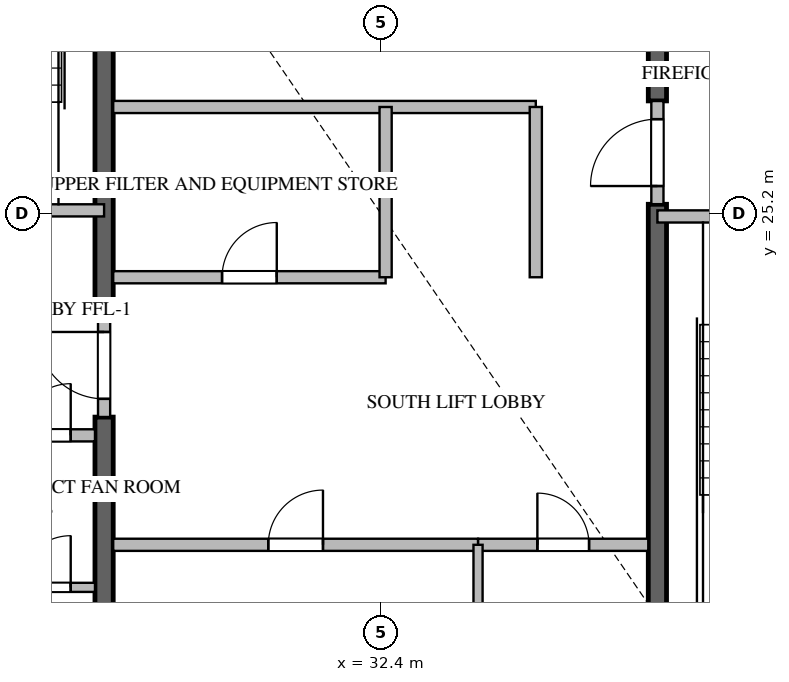
"""IFC4 building model, lengths in metres.
Left out: names, types, materials, properties, quantities, classifications, styles, units other than length and angle.
Written with IfcOpenShell. Run it as: python <this file> out.ifc"""

import sys

from ifc_helpers import new_model, si_unit, direction, frame, frame_2d, origin, place, context, subcontext, project, spatial, rectangle, extrude, source, transform, mapped, element, fill, save


model = new_model("IFC4")
c1 = context("Model", 3, precision=1e-05, world=origin(), true_north=direction((0.0, 1.0)))
c2 = subcontext(c1, "Body", "Model", "MODEL_VIEW")
j1 = project(units=[si_unit("LENGTHUNIT", "METRE"), si_unit("PLANEANGLEUNIT", "RADIAN")], contexts=[c1])
p1 = place(None, origin())
s1 = spatial("IfcSite", under=j1, at=p1, CompositionType="ELEMENT")
p2 = place(p1, origin())
s2 = spatial("IfcBuilding", under=s1, at=p2, CompositionType="ELEMENT")
p3 = place(p2, frame((0.0, 0.0, 313.7)))
s3 = spatial("IfcBuildingStorey", under=s2, at=p3, CompositionType="ELEMENT", Elevation=313.7)
p4 = place(p3, frame((27.85, 16.975, -0.26), z_axis=(0.0, 0.0, 1.0), x_axis=(0.0, 1.0, 0.0)))
e1 = element("IfcWall", 1, at=p4, inside=s3, PredefinedType="SHEAR", context=c2, shape_type="SweptSolid", body=[
    extrude(rectangle(XDim=4.875, YDim=0.3, at=frame_2d((2.438, 0.0))), origin(), (0.0, 0.0, 1.0), 4.048),
])
p5 = place(p3, frame((27.85, 23.55, -0.26), z_axis=(0.0, 0.0, 1.0), x_axis=(0.0, 1.0, 0.0)))
e2 = element("IfcWall", 2, at=p5, inside=s3, PredefinedType="SHEAR", context=c2, shape_type="SweptSolid", body=[
    extrude(rectangle(XDim=9.875, YDim=0.3, at=frame_2d((4.938, 0.0))), origin(), (0.0, 0.0, 1.0), 4.048),
])
p6 = place(p3, frame((36.95, 16.975, -0.26), z_axis=(0.0, 0.0, 1.0), x_axis=(0.0, 1.0, 0.0)))
e3 = element("IfcWall", 3, at=p6, inside=s3, PredefinedType="SHEAR", context=c2, shape_type="SweptSolid", body=[
    extrude(rectangle(XDim=8.375, YDim=0.3, at=frame_2d((4.188, 0.0))), origin(), (0.0, 0.0, 1.0), 4.048),
])
p7 = place(p3, frame((36.95, 27.05, -0.26), z_axis=(0.0, 0.0, 1.0), x_axis=(0.0, 1.0, 0.0)))
e4 = element("IfcWall", 4, at=p7, inside=s3, PredefinedType="SHEAR", context=c2, shape_type="SweptSolid", body=[
    extrude(rectangle(XDim=6.375, YDim=0.3, at=frame_2d((3.188, 0.0))), origin(), (0.0, 0.0, 1.0), 4.048),
])
p8 = place(p3, frame((23.4, 25.25, 0.0), z_axis=(0.0, 0.0, 1.0), x_axis=(1.0, 0.0, 0.0)))
e5 = element("IfcWall", 5, at=p8, inside=s3, PredefinedType="STANDARD", context=c2, shape_type="SweptSolid", body=[
    extrude(rectangle(XDim=4.45, YDim=0.2, at=frame_2d((2.225, 0.0))), origin(), (0.0, 0.0, 1.0), 3.79),
])
p9 = place(p8, frame((1.65, 0.0, 0.0)))
e6 = element("IfcOpeningElement", 6, at=p9, cuts=e5, PredefinedType="OPENING", context=c2, shape_type="SweptSolid", body=[
    extrude(rectangle(XDim=1.1, YDim=2.15, at=frame_2d((0.55, 1.075))), frame((0.0, 0.11, 0.0), z_axis=(0.0, -1.0, 0.0), x_axis=(1.0, 0.0, 0.0)), (0.0, 0.0, 1.0), 0.22),
])
p10 = place(p3, frame((36.95, 25.15, 0.0), z_axis=(0.0, 0.0, 1.0), x_axis=(1.0, 0.0, 0.0)))
e7 = element("IfcWall", 7, at=p10, inside=s3, PredefinedType="STANDARD", context=c2, shape_type="SweptSolid", body=[
    extrude(rectangle(XDim=4.45, YDim=0.2, at=frame_2d((2.225, 0.0))), origin(), (0.0, 0.0, 1.0), 3.79),
])
p11 = place(p10, frame((1.65, 0.0, 0.0)))
e8 = element("IfcOpeningElement", 8, at=p11, cuts=e7, PredefinedType="OPENING", context=c2, shape_type="SweptSolid", body=[
    extrude(rectangle(XDim=1.1, YDim=2.15, at=frame_2d((0.55, 1.075))), frame((0.0, 0.11, 0.0), z_axis=(0.0, -1.0, 0.0), x_axis=(1.0, 0.0, 0.0)), (0.0, 0.0, 1.0), 0.22),
])
p12 = place(p3, frame((26.052, 21.55, 0.0), z_axis=(0.0, 0.0, 1.0), x_axis=(1.0, 0.0, 0.0)))
e9 = element("IfcWall", 9, at=p12, inside=s3, PredefinedType="STANDARD", context=c2, shape_type="SweptSolid", body=[
    extrude(rectangle(XDim=1.648, YDim=0.2, at=frame_2d((0.824, 0.0))), origin(), (0.0, 0.0, 1.0), 3.79),
])
p13 = place(p12, frame((0.399, 0.0, 0.0)))
e10 = element("IfcOpeningElement", 10, at=p13, cuts=e9, PredefinedType="OPENING", context=c2, shape_type="SweptSolid", body=[
    extrude(rectangle(XDim=0.85, YDim=2.1, at=frame_2d((0.425, 1.05))), frame((0.0, 0.11, 0.0), z_axis=(0.0, -1.0, 0.0), x_axis=(1.0, 0.0, 0.0)), (0.0, 0.0, 1.0), 0.22),
])
p14 = place(p3, frame((27.85, 21.852, 0.0), z_axis=(0.0, 0.0, 1.0), x_axis=(0.0, 1.0, 0.0)))
e11 = element("IfcWall", 11, at=p14, inside=s3, PredefinedType="STANDARD", context=c2, shape_type="SweptSolid", body=[
    extrude(rectangle(XDim=1.696, YDim=0.2, at=frame_2d((0.848, 0.0))), origin(), (0.0, 0.0, 1.0), 3.79),
])
p15 = place(p14, frame((0.298, 0.0, 0.0)))
e12 = element("IfcOpeningElement", 12, at=p15, cuts=e11, PredefinedType="OPENING", context=c2, shape_type="SweptSolid", body=[
    extrude(rectangle(XDim=1.1, YDim=2.15, at=frame_2d((0.55, 1.075))), frame((0.0, 0.11, 0.0), z_axis=(0.0, -1.0, 0.0), x_axis=(1.0, 0.0, 0.0)), (0.0, 0.0, 1.0), 0.22),
])
p16 = place(p3, frame((36.95, 25.352, 0.0), z_axis=(0.0, 0.0, 1.0), x_axis=(0.0, 1.0, 0.0)))
e13 = element("IfcWall", 13, at=p16, inside=s3, PredefinedType="STANDARD", context=c2, shape_type="SweptSolid", body=[
    extrude(rectangle(XDim=1.696, YDim=0.2, at=frame_2d((0.848, 0.0))), origin(), (0.0, 0.0, 1.0), 3.79),
])
p17 = place(p16, frame((0.298, 0.0, 0.0)))
e14 = element("IfcOpeningElement", 14, at=p17, cuts=e13, PredefinedType="OPENING", context=c2, shape_type="SweptSolid", body=[
    extrude(rectangle(XDim=1.1, YDim=2.15, at=frame_2d((0.55, 1.075))), frame((0.0, 0.11, 0.0), z_axis=(0.0, -1.0, 0.0), x_axis=(1.0, 0.0, 0.0)), (0.0, 0.0, 1.0), 0.22),
])
p18 = place(p3, frame((26.052, 19.05, 0.0), z_axis=(0.0, 0.0, 1.0), x_axis=(1.0, 0.0, 0.0)))
e15 = element("IfcWall", 15, at=p18, inside=s3, PredefinedType="PARTITIONING", context=c2, shape_type="SweptSolid", body=[
    extrude(rectangle(XDim=1.648, YDim=0.15, at=frame_2d((0.824, 0.0))), origin(), (0.0, 0.0, 1.0), 3.79),
])
p19 = place(p18, frame((0.399, 0.0, 0.0)))
e16 = element("IfcOpeningElement", 16, at=p19, cuts=e15, PredefinedType="OPENING", context=c2, shape_type="SweptSolid", body=[
    extrude(rectangle(XDim=0.85, YDim=2.1, at=frame_2d((0.425, 1.05))), frame((0.0, 0.085, 0.0), z_axis=(0.0, -1.0, 0.0), x_axis=(1.0, 0.0, 0.0)), (0.0, 0.0, 1.0), 0.17),
])
p20 = place(p3, frame((28.0, 19.75, 0.0), z_axis=(0.0, 0.0, 1.0), x_axis=(1.0, 0.0, 0.0)))
e17 = element("IfcWall", 17, at=p20, inside=s3, PredefinedType="STANDARD", context=c2, shape_type="SweptSolid", body=[
    extrude(rectangle(XDim=6.0, YDim=0.2, at=frame_2d((3.0, 0.0))), origin(), (0.0, 0.0, 1.0), 3.79),
])
p21 = place(p20, frame((2.55, 0.0, 0.0)))
e18 = element("IfcOpeningElement", 18, at=p21, cuts=e17, PredefinedType="OPENING", context=c2, shape_type="SweptSolid", body=[
    extrude(rectangle(XDim=0.9, YDim=2.1, at=frame_2d((0.45, 1.05))), frame((0.0, 0.11, 0.0), z_axis=(0.0, -1.0, 0.0), x_axis=(1.0, 0.0, 0.0)), (0.0, 0.0, 1.0), 0.22),
])
p22 = place(p3, frame((34.002, 19.75, 0.0), z_axis=(0.0, 0.0, 1.0), x_axis=(1.0, 0.0, 0.0)))
e19 = element("IfcWall", 19, at=p22, inside=s3, PredefinedType="STANDARD", context=c2, shape_type="SweptSolid", body=[
    extrude(rectangle(XDim=2.798, YDim=0.2, at=frame_2d((1.399, 0.0))), origin(), (0.0, 0.0, 1.0), 3.79),
])
p23 = place(p22, frame((0.974, 0.0, 0.0)))
e20 = element("IfcOpeningElement", 20, at=p23, cuts=e19, PredefinedType="OPENING", context=c2, shape_type="SweptSolid", body=[
    extrude(rectangle(XDim=0.85, YDim=2.1, at=frame_2d((0.425, 1.05))), frame((0.0, 0.11, 0.0), z_axis=(0.0, -1.0, 0.0), x_axis=(1.0, 0.0, 0.0)), (0.0, 0.0, 1.0), 0.22),
])
p24 = place(p3, frame((34.0, 17.02, 0.0), z_axis=(0.0, 0.0, 1.0), x_axis=(0.0, 1.0, 0.0)))
e21 = element("IfcWall", 21, at=p24, inside=s3, PredefinedType="PARTITIONING", context=c2, shape_type="SweptSolid", body=[
    extrude(rectangle(XDim=2.73, YDim=0.15, at=frame_2d((1.365, 0.0))), origin(), (0.0, 0.0, 1.0), 3.79),
])
p25 = place(p3, frame((28.0, 26.95, 0.0), z_axis=(0.0, 0.0, 1.0), x_axis=(1.0, 0.0, 0.0)))
e22 = element("IfcWall", 22, at=p25, inside=s3, PredefinedType="STANDARD", context=c2, shape_type="SweptSolid", body=[
    extrude(rectangle(XDim=6.95, YDim=0.2, at=frame_2d((3.475, 0.0))), origin(), (0.0, 0.0, 1.0), 3.79),
])
p26 = place(p3, frame((34.95, 24.15, 0.0), z_axis=(0.0, 0.0, 1.0), x_axis=(0.0, 1.0, 0.0)))
e23 = element("IfcWall", 23, at=p26, inside=s3, PredefinedType="STANDARD", context=c2, shape_type="SweptSolid", body=[
    extrude(rectangle(XDim=2.8, YDim=0.2, at=frame_2d((1.4, 0.0))), origin(), (0.0, 0.0, 1.0), 3.79),
])
p27 = place(p3, frame((28.0, 24.15, 0.0), z_axis=(0.0, 0.0, 1.0), x_axis=(1.0, 0.0, 0.0)))
e24 = element("IfcWall", 24, at=p27, inside=s3, PredefinedType="STANDARD", context=c2, shape_type="SweptSolid", body=[
    extrude(rectangle(XDim=4.48, YDim=0.2, at=frame_2d((2.24, 0.0))), origin(), (0.0, 0.0, 1.0), 3.79),
])
p28 = place(p27, frame((1.79, 0.0, 0.0)))
e25 = element("IfcOpeningElement", 25, at=p28, cuts=e24, PredefinedType="OPENING", context=c2, shape_type="SweptSolid", body=[
    extrude(rectangle(XDim=0.9, YDim=2.1, at=frame_2d((0.45, 1.05))), frame((0.0, 0.11, 0.0), z_axis=(0.0, -1.0, 0.0), x_axis=(1.0, 0.0, 0.0)), (0.0, 0.0, 1.0), 0.22),
])
p29 = place(p3, frame((32.48, 24.15, 0.0), z_axis=(0.0, 0.0, 1.0), x_axis=(0.0, 1.0, 0.0)))
e26 = element("IfcWall", 26, at=p29, inside=s3, PredefinedType="STANDARD", context=c2, shape_type="SweptSolid", body=[
    extrude(rectangle(XDim=2.8, YDim=0.2, at=frame_2d((1.4, 0.0))), origin(), (0.0, 0.0, 1.0), 3.79),
])
m1 = source(origin(), c2, "Body", "SweptSolid", [
    extrude(rectangle(XDim=0.85, YDim=2.1, at=frame_2d((0.425, 1.05))), frame((0.0, 0.025, 0.0), z_axis=(0.0, -1.0, 0.0), x_axis=(1.0, 0.0, 0.0)), (0.0, 0.0, 1.0), 0.05),
])
p30 = place(p13, origin())
e27 = element("IfcDoor", 27, at=p30, inside=s3, OperationType="SINGLE_SWING_RIGHT", PredefinedType="DOOR", context=c2, shape_type="MappedRepresentation", body=[
    mapped(m1, transform((0.0, 0.0, 0.0), scale=1.0)),
])
fill(e10, e27)
m2 = source(origin(), c2, "Body", "SweptSolid", [
    extrude(rectangle(XDim=1.1, YDim=2.15, at=frame_2d((0.55, 1.075))), frame((0.0, 0.025, 0.0), z_axis=(0.0, -1.0, 0.0), x_axis=(1.0, 0.0, 0.0)), (0.0, 0.0, 1.0), 0.05),
])
p31 = place(p15, origin())
e28 = element("IfcDoor", 28, at=p31, inside=s3, OperationType="SINGLE_SWING_RIGHT", PredefinedType="DOOR", context=c2, shape_type="MappedRepresentation", body=[
    mapped(m2, transform((0.0, 0.0, 0.0), scale=1.0)),
])
fill(e12, e28)
p32 = place(p17, origin())
e29 = element("IfcDoor", 29, at=p32, inside=s3, OperationType="SINGLE_SWING_LEFT", PredefinedType="DOOR", context=c2, shape_type="MappedRepresentation", body=[
    mapped(m2, transform((0.0, 0.0, 0.0), scale=1.0)),
])
fill(e14, e29)
p33 = place(p19, origin())
e30 = element("IfcDoor", 30, at=p33, inside=s3, OperationType="SINGLE_SWING_RIGHT", PredefinedType="DOOR", context=c2, shape_type="MappedRepresentation", body=[
    mapped(m1, transform((0.0, 0.0, 0.0), scale=1.0)),
])
fill(e16, e30)
m3 = source(origin(), c2, "Body", "SweptSolid", [
    extrude(rectangle(XDim=0.9, YDim=2.1, at=frame_2d((0.45, 1.05))), frame((0.0, 0.025, 0.0), z_axis=(0.0, -1.0, 0.0), x_axis=(1.0, 0.0, 0.0)), (0.0, 0.0, 1.0), 0.05),
])
p34 = place(p21, origin())
e31 = element("IfcDoor", 31, at=p34, inside=s3, OperationType="SINGLE_SWING_RIGHT", PredefinedType="DOOR", context=c2, shape_type="MappedRepresentation", body=[
    mapped(m3, transform((0.0, 0.0, 0.0), scale=1.0)),
])
fill(e18, e31)
p35 = place(p23, origin())
e32 = element("IfcDoor", 32, at=p35, inside=s3, OperationType="SINGLE_SWING_LEFT", PredefinedType="DOOR", context=c2, shape_type="MappedRepresentation", body=[
    mapped(m1, transform((0.0, 0.0, 0.0), scale=1.0)),
])
fill(e20, e32)
p36 = place(p28, origin())
e33 = element("IfcDoor", 33, at=p36, inside=s3, OperationType="SINGLE_SWING_RIGHT", PredefinedType="DOOR", context=c2, shape_type="MappedRepresentation", body=[
    mapped(m3, transform((0.0, 0.0, 0.0), scale=1.0)),
])
fill(e25, e33)
save(model, sys.argv[1])
